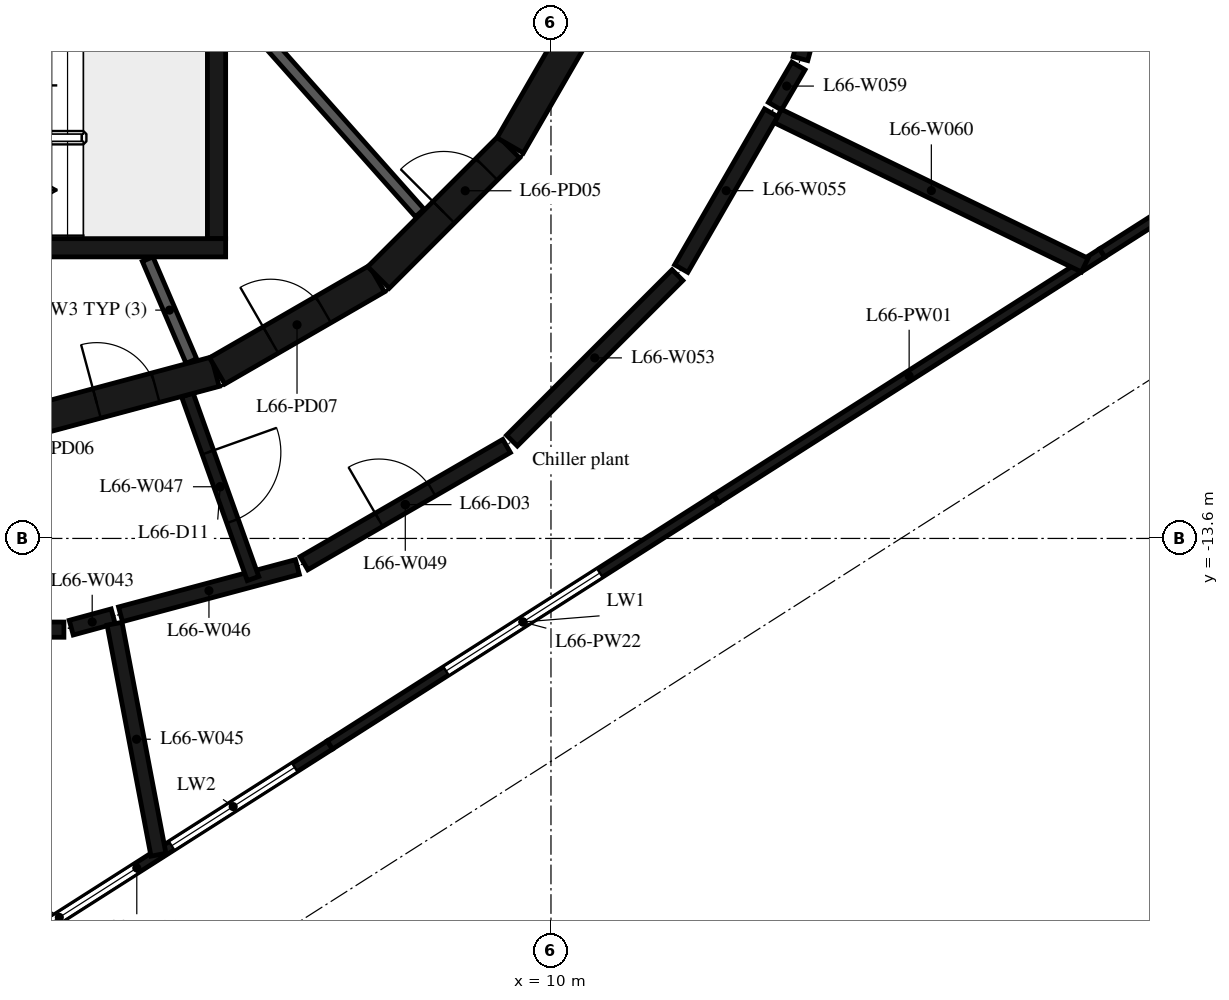
"""IFC4 building model, lengths in metres.
Left out: names, types, materials, properties, quantities, classifications, styles, units other than length and angle.
Written with IfcOpenShell. Run it as: python <this file> out.ifc"""

import sys

from ifc_helpers import new_model, si_unit, direction, frame, frame_2d, origin, place, context, subcontext, project, spatial, rectangle, extrude, element, fill, save


model = new_model("IFC4")
c1 = context("Model", 3, precision=1e-05, world=origin(), true_north=direction((0.0, 1.0)))
c2 = subcontext(c1, "Body", "Model", "MODEL_VIEW")
j1 = project(units=[si_unit("LENGTHUNIT", "METRE"), si_unit("PLANEANGLEUNIT", "RADIAN")], contexts=[c1])
p1 = place(None, origin())
s1 = spatial("IfcSite", under=j1, at=p1, CompositionType="ELEMENT")
p2 = place(p1, origin())
s2 = spatial("IfcBuilding", under=s1, at=p2, CompositionType="ELEMENT")
p3 = place(p2, frame((0.0, 0.0, 258.2)))
s3 = spatial("IfcBuildingStorey", under=s2, at=p3, CompositionType="ELEMENT", Elevation=258.2)
p4 = place(p3, frame((12.715, -12.951, 0.0), z_axis=(0.0, 0.0, 1.0), x_axis=(0.843393042763, 0.537297101629, 0.0)))
e1 = element("IfcWall", 1, at=p4, inside=s3, PredefinedType="STANDARD", context=c2, shape_type="SweptSolid", body=[
    extrude(rectangle(XDim=7.53, YDim=0.16, at=frame_2d((3.765, 0.0))), origin(), (0.0, 0.0, 1.0), 4.75),
])
p5 = place(p3, frame((19.066, -8.905, 0.0), z_axis=(0.0, 0.0, 1.0), x_axis=(0.843393436183, 0.537296484079, 0.0)))
e2 = element("IfcWall", 2, at=p5, inside=s3, PredefinedType="STANDARD", context=c2, shape_type="SweptSolid", body=[
    extrude(rectangle(XDim=5.74, YDim=0.16, at=frame_2d((2.87, 0.0))), origin(), (0.0, 0.0, 1.0), 4.75),
])
p6 = place(p3, frame((0.013, -21.043, 0.0), z_axis=(0.0, 0.0, 1.0), x_axis=(0.843393042763, 0.537297101629, 0.0)))
e3 = element("IfcWall", 3, at=p6, inside=s3, PredefinedType="STANDARD", context=c2, shape_type="SweptSolid", body=[
    extrude(rectangle(XDim=7.53, YDim=0.16, at=frame_2d((3.765, 0.0))), origin(), (0.0, 0.0, 1.0), 4.75),
])
p7 = place(p6, frame((0.755, 0.0, 1.0)))
e4 = element("IfcOpeningElement", 4, at=p7, cuts=e3, PredefinedType="OPENING", context=c2, shape_type="SweptSolid", body=[
    extrude(rectangle(XDim=3.0, YDim=2.2, at=frame_2d((1.5, 1.1))), frame((0.0, 0.09, 0.0), z_axis=(0.0, -1.0, 0.0), x_axis=(1.0, 0.0, 0.0)), (0.0, 0.0, 1.0), 0.18),
])
p8 = place(p6, frame((4.445, 0.0, 1.0)))
e5 = element("IfcOpeningElement", 5, at=p8, cuts=e3, PredefinedType="OPENING", context=c2, shape_type="SweptSolid", body=[
    extrude(rectangle(XDim=2.4, YDim=2.2, at=frame_2d((1.2, 1.1))), frame((0.0, 0.09, 0.0), z_axis=(0.0, -1.0, 0.0), x_axis=(1.0, 0.0, 0.0)), (0.0, 0.0, 1.0), 0.18),
])
p9 = place(p3, frame((6.364, -16.997, 0.0), z_axis=(0.0, 0.0, 1.0), x_axis=(0.843393042763, 0.537297101629, 0.0)))
e6 = element("IfcWall", 6, at=p9, inside=s3, PredefinedType="STANDARD", context=c2, shape_type="SweptSolid", body=[
    extrude(rectangle(XDim=7.53, YDim=0.16, at=frame_2d((3.765, 0.0))), origin(), (0.0, 0.0, 1.0), 4.75),
])
p10 = place(p9, frame((2.265, 0.0, 1.0)))
e7 = element("IfcOpeningElement", 7, at=p10, cuts=e6, PredefinedType="OPENING", context=c2, shape_type="SweptSolid", body=[
    extrude(rectangle(XDim=3.0, YDim=2.2, at=frame_2d((1.5, 1.1))), frame((0.0, 0.09, 0.0), z_axis=(0.0, -1.0, 0.0), x_axis=(1.0, 0.0, 0.0)), (0.0, 0.0, 1.0), 0.18),
])
p11 = place(p3, frame((1.55, -11.643, 0.0), z_axis=(0.0, 0.0, 1.0), x_axis=(0.965948410781, 0.258734743916, 0.0)))
e8 = element("IfcWall", 8, at=p11, inside=s3, PredefinedType="SHEAR", context=c2, shape_type="SweptSolid", body=[
    extrude(rectangle(XDim=3.033, YDim=0.5, at=frame_2d((1.516, 0.0))), origin(), (0.0, 0.0, 1.0), 4.75),
])
p12 = place(p11, frame((1.016, 0.0, 0.0)))
e9 = element("IfcOpeningElement", 9, at=p12, cuts=e8, PredefinedType="OPENING", context=c2, shape_type="SweptSolid", body=[
    extrude(rectangle(XDim=1.0, YDim=2.4, at=frame_2d((0.5, 1.2))), frame((0.0, 0.26, 0.0), z_axis=(0.0, -1.0, 0.0), x_axis=(1.0, 0.0, 0.0)), (0.0, 0.0, 1.0), 0.52),
])
p13 = place(p3, frame((4.51, -10.845, 0.0), z_axis=(0.0, 0.0, 1.0), x_axis=(0.865975092491, 0.500087131594, 0.0)))
e10 = element("IfcWall", 10, at=p13, inside=s3, PredefinedType="SHEAR", context=c2, shape_type="SweptSolid", body=[
    extrude(rectangle(XDim=3.033, YDim=0.5, at=frame_2d((1.516, 0.0))), origin(), (0.0, 0.0, 1.0), 4.75),
])
p14 = place(p13, frame((1.016, 0.0, 0.0)))
e11 = element("IfcOpeningElement", 11, at=p14, cuts=e10, PredefinedType="OPENING", context=c2, shape_type="SweptSolid", body=[
    extrude(rectangle(XDim=1.0, YDim=2.4, at=frame_2d((0.5, 1.2))), frame((0.0, 0.26, 0.0), z_axis=(0.0, -1.0, 0.0), x_axis=(1.0, 0.0, 0.0)), (0.0, 0.0, 1.0), 0.52),
])
p15 = place(p3, frame((7.164, -9.308, 0.0), z_axis=(0.0, 0.0, 1.0), x_axis=(0.707106781187, 0.707106781187, 0.0)))
e12 = element("IfcWall", 12, at=p15, inside=s3, PredefinedType="SHEAR", context=c2, shape_type="SweptSolid", body=[
    extrude(rectangle(XDim=3.032, YDim=0.5, at=frame_2d((1.516, 0.0))), origin(), (0.0, 0.0, 1.0), 4.75),
])
p16 = place(p15, frame((1.516, 0.0, 0.0)))
e13 = element("IfcOpeningElement", 13, at=p16, cuts=e12, PredefinedType="OPENING", context=c2, shape_type="SweptSolid", body=[
    extrude(rectangle(XDim=1.0, YDim=2.4, at=frame_2d((0.5, 1.2))), frame((0.0, 0.26, 0.0), z_axis=(0.0, -1.0, 0.0), x_axis=(1.0, 0.0, 0.0)), (0.0, 0.0, 1.0), 0.52),
])
p17 = place(p3, frame((9.329, -7.137, 0.0), z_axis=(0.0, 0.0, 1.0), x_axis=(0.500087131594, 0.865975092491, 0.0)))
e14 = element("IfcWall", 14, at=p17, inside=s3, PredefinedType="SHEAR", context=c2, shape_type="SweptSolid", body=[
    extrude(rectangle(XDim=3.033, YDim=0.5, at=frame_2d((1.516, 0.0))), origin(), (0.0, 0.0, 1.0), 4.75),
])
p18 = place(p3, frame((4.5, -8.67, 0.0), z_axis=(0.0, 0.0, 1.0), x_axis=(0.0, 1.0, 0.0)))
e15 = element("IfcWall", 15, at=p18, inside=s3, PredefinedType="SHEAR", context=c2, shape_type="SweptSolid", body=[
    extrude(rectangle(XDim=3.32, YDim=0.3, at=frame_2d((1.66, 0.0))), origin(), (0.0, 0.0, 1.0), 4.75),
])
p19 = place(p3, frame((0.1, -8.82, 0.0), z_axis=(0.0, 0.0, 1.0), x_axis=(1.0, 0.0, 0.0)))
e16 = element("IfcWall", 16, at=p19, inside=s3, PredefinedType="SHEAR", context=c2, shape_type="SweptSolid", body=[
    extrude(rectangle(XDim=4.55, YDim=0.3, at=frame_2d((2.275, 0.0))), origin(), (0.0, 0.0, 1.0), 4.75),
])
p20 = place(p3, frame((7.842, -8.248, 0.0), z_axis=(0.0, 0.0, 1.0), x_axis=(-0.66446128181, 0.747322691329, 0.0)))
e17 = element("IfcWall", 17, at=p20, inside=s3, PredefinedType="PARTITIONING", context=c2, shape_type="SweptSolid", body=[
    extrude(rectangle(XDim=4.198, YDim=0.19, at=frame_2d((2.099, 0.0))), origin(), (0.0, 0.0, 1.0), 4.75),
])
p21 = place(p3, frame((3.367, -9.007, 0.0), z_axis=(0.0, 0.0, 1.0), x_axis=(0.394387482265, -0.918944238696, 0.0)))
e18 = element("IfcWall", 18, at=p21, inside=s3, PredefinedType="PARTITIONING", context=c2, shape_type="SweptSolid", body=[
    extrude(rectangle(XDim=1.825, YDim=0.19, at=frame_2d((0.913, 0.0))), origin(), (0.0, 0.0, 1.0), 4.75),
])
p22 = place(p3, frame((-1.865, -15.1, 0.0), z_axis=(0.0, 0.0, 1.0), x_axis=(1.0, 0.0, 0.0)))
e19 = element("IfcWall", 19, at=p22, inside=s3, PredefinedType="PARTITIONING", context=c2, shape_type="SweptSolid", body=[
    extrude(rectangle(XDim=3.855, YDim=0.25, at=frame_2d((1.927, 0.0))), origin(), (0.0, 0.0, 1.0), 4.75),
])
p23 = place(p22, frame((1.427, 0.0, 0.0)))
e20 = element("IfcOpeningElement", 20, at=p23, cuts=e19, PredefinedType="OPENING", context=c2, shape_type="SweptSolid", body=[
    extrude(rectangle(XDim=1.0, YDim=2.1, at=frame_2d((0.5, 1.05))), frame((0.0, 0.135, 0.0), z_axis=(0.0, -1.0, 0.0), x_axis=(1.0, 0.0, 0.0)), (0.0, 0.0, 1.0), 0.27),
])
p24 = place(p3, frame((2.111, -15.067, 0.0), z_axis=(0.0, 0.0, 1.0), x_axis=(0.965039301335, 0.262105221007, 0.0)))
e21 = element("IfcWall", 21, at=p24, inside=s3, PredefinedType="PARTITIONING", context=c2, shape_type="SweptSolid", body=[
    extrude(rectangle(XDim=0.714, YDim=0.25, at=frame_2d((0.357, 0.0))), origin(), (0.0, 0.0, 1.0), 4.75),
])
p25 = place(p3, frame((2.823, -15.003, 0.0), z_axis=(0.0, 0.0, 1.0), x_axis=(0.18669720821, -0.982417504143, 0.0)))
e22 = element("IfcWall", 22, at=p25, inside=s3, PredefinedType="PARTITIONING", context=c2, shape_type="SweptSolid", body=[
    extrude(rectangle(XDim=3.867, YDim=0.25, at=frame_2d((1.933, 0.0))), origin(), (0.0, 0.0, 1.0), 4.75),
])
p26 = place(p3, frame((2.921, -14.848, 0.0), z_axis=(0.0, 0.0, 1.0), x_axis=(0.966090816863, 0.258202504969, 0.0)))
e23 = element("IfcWall", 23, at=p26, inside=s3, PredefinedType="PARTITIONING", context=c2, shape_type="SweptSolid", body=[
    extrude(rectangle(XDim=3.011, YDim=0.25, at=frame_2d((1.506, 0.0))), origin(), (0.0, 0.0, 1.0), 4.75),
])
p27 = place(p3, frame((4.02, -11.24, 0.0), z_axis=(0.0, 0.0, 1.0), x_axis=(0.336751058688, -0.941593715183, 0.0)))
e24 = element("IfcWall", 24, at=p27, inside=s3, PredefinedType="PARTITIONING", context=c2, shape_type="SweptSolid", body=[
    extrude(rectangle(XDim=3.207, YDim=0.2, at=frame_2d((1.604, 0.0))), origin(), (0.0, 0.0, 1.0), 4.75),
])
p28 = place(p27, frame((1.004, 0.0, 0.0)))
e25 = element("IfcOpeningElement", 25, at=p28, cuts=e24, PredefinedType="OPENING", context=c2, shape_type="SweptSolid", body=[
    extrude(rectangle(XDim=1.2, YDim=2.1, at=frame_2d((0.6, 1.05))), frame((0.0, 0.11, 0.0), z_axis=(0.0, -1.0, 0.0), x_axis=(1.0, 0.0, 0.0)), (0.0, 0.0, 1.0), 0.22),
])
p29 = place(p3, frame((5.938, -14.007, 0.0), z_axis=(0.0, 0.0, 1.0), x_axis=(0.865615852585, 0.500708693508, 0.0)))
e26 = element("IfcWall", 26, at=p29, inside=s3, PredefinedType="PARTITIONING", context=c2, shape_type="SweptSolid", body=[
    extrude(rectangle(XDim=3.849, YDim=0.25, at=frame_2d((1.925, 0.0))), origin(), (0.0, 0.0, 1.0), 4.75),
])
p30 = place(p29, frame((1.425, 0.0, 0.0)))
e27 = element("IfcOpeningElement", 27, at=p30, cuts=e26, PredefinedType="OPENING", context=c2, shape_type="SweptSolid", body=[
    extrude(rectangle(XDim=1.0, YDim=2.1, at=frame_2d((0.5, 1.05))), frame((0.0, 0.135, 0.0), z_axis=(0.0, -1.0, 0.0), x_axis=(1.0, 0.0, 0.0)), (0.0, 0.0, 1.0), 0.27),
])
p31 = place(p3, frame((9.358, -11.992, 0.0), z_axis=(0.0, 0.0, 1.0), x_axis=(0.707106781187, 0.707106781187, 0.0)))
e28 = element("IfcWall", 28, at=p31, inside=s3, PredefinedType="PARTITIONING", context=c2, shape_type="SweptSolid", body=[
    extrude(rectangle(XDim=3.849, YDim=0.25, at=frame_2d((1.925, 0.0))), origin(), (0.0, 0.0, 1.0), 4.75),
])
p32 = place(p3, frame((12.142, -9.162, 0.0), z_axis=(0.0, 0.0, 1.0), x_axis=(0.499717688814, 0.866188334882, 0.0)))
e29 = element("IfcWall", 29, at=p32, inside=s3, PredefinedType="PARTITIONING", context=c2, shape_type="SweptSolid", body=[
    extrude(rectangle(XDim=2.957, YDim=0.25, at=frame_2d((1.479, 0.0))), origin(), (0.0, 0.0, 1.0), 4.75),
])
p33 = place(p3, frame((13.683, -6.492, 0.0), z_axis=(0.0, 0.0, 1.0), x_axis=(0.504583428371, 0.863362938638, 0.0)))
e30 = element("IfcWall", 30, at=p33, inside=s3, PredefinedType="PARTITIONING", context=c2, shape_type="SweptSolid", body=[
    extrude(rectangle(XDim=0.767, YDim=0.25, at=frame_2d((0.383, 0.0))), origin(), (0.0, 0.0, 1.0), 4.75),
])
p34 = place(p3, frame((13.732, -6.655, 0.0), z_axis=(0.0, 0.0, 1.0), x_axis=(0.899529661215, -0.436859689825, 0.0)))
e31 = element("IfcWall", 31, at=p34, inside=s3, PredefinedType="PARTITIONING", context=c2, shape_type="SweptSolid", body=[
    extrude(rectangle(XDim=5.609, YDim=0.25, at=frame_2d((2.805, 0.0))), origin(), (0.0, 0.0, 1.0), 4.75),
])
p35 = place(p3, frame((14.102, -5.709, 0.0), z_axis=(0.0, 0.0, 1.0), x_axis=(0.259118468411, 0.965845546311, 0.0)))
e32 = element("IfcWall", 32, at=p35, inside=s3, PredefinedType="PARTITIONING", context=c2, shape_type="SweptSolid", body=[
    extrude(rectangle(XDim=3.851, YDim=0.25, at=frame_2d((1.925, 0.0))), origin(), (0.0, 0.0, 1.0), 4.75),
])
p36 = place(p7, origin())
e33 = element("IfcWindow", 33, at=p36, inside=s3, PartitioningType="SINGLE_PANEL", PredefinedType="WINDOW", context=c2, shape_type="SweptSolid", body=[
    extrude(rectangle(XDim=3.0, YDim=2.2, at=frame_2d((1.5, 1.1))), frame((0.0, 0.03, 0.0), z_axis=(0.0, -1.0, 0.0), x_axis=(1.0, 0.0, 0.0)), (0.0, 0.0, 1.0), 0.06),
])
fill(e4, e33)
p37 = place(p8, origin())
e34 = element("IfcWindow", 34, at=p37, inside=s3, PartitioningType="SINGLE_PANEL", PredefinedType="WINDOW", context=c2, shape_type="SweptSolid", body=[
    extrude(rectangle(XDim=2.4, YDim=2.2, at=frame_2d((1.2, 1.1))), frame((0.0, 0.03, 0.0), z_axis=(0.0, -1.0, 0.0), x_axis=(1.0, 0.0, 0.0)), (0.0, 0.0, 1.0), 0.06),
])
fill(e5, e34)
p38 = place(p10, origin())
e35 = element("IfcWindow", 35, at=p38, inside=s3, PartitioningType="SINGLE_PANEL", PredefinedType="WINDOW", context=c2, shape_type="SweptSolid", body=[
    extrude(rectangle(XDim=3.0, YDim=2.2, at=frame_2d((1.5, 1.1))), frame((0.0, 0.03, 0.0), z_axis=(0.0, -1.0, 0.0), x_axis=(1.0, 0.0, 0.0)), (0.0, 0.0, 1.0), 0.06),
])
fill(e7, e35)
p39 = place(p16, origin())
e36 = element("IfcDoor", 36, at=p39, inside=s3, OperationType="SINGLE_SWING_LEFT", PredefinedType="DOOR", context=c2, shape_type="SweptSolid", body=[
    extrude(rectangle(XDim=1.0, YDim=2.4, at=frame_2d((0.5, 1.2))), frame((0.0, 0.025, 0.0), z_axis=(0.0, -1.0, 0.0), x_axis=(1.0, 0.0, 0.0)), (0.0, 0.0, 1.0), 0.05),
])
fill(e13, e36)
p40 = place(p12, origin())
e37 = element("IfcDoor", 37, at=p40, inside=s3, OperationType="SINGLE_SWING_RIGHT", PredefinedType="DOOR", context=c2, shape_type="SweptSolid", body=[
    extrude(rectangle(XDim=1.0, YDim=2.4, at=frame_2d((0.5, 1.2))), frame((0.0, 0.025, 0.0), z_axis=(0.0, -1.0, 0.0), x_axis=(1.0, 0.0, 0.0)), (0.0, 0.0, 1.0), 0.05),
])
fill(e9, e37)
p41 = place(p14, origin())
e38 = element("IfcDoor", 38, at=p41, inside=s3, OperationType="SINGLE_SWING_LEFT", PredefinedType="DOOR", context=c2, shape_type="SweptSolid", body=[
    extrude(rectangle(XDim=1.0, YDim=2.4, at=frame_2d((0.5, 1.2))), frame((0.0, 0.025, 0.0), z_axis=(0.0, -1.0, 0.0), x_axis=(1.0, 0.0, 0.0)), (0.0, 0.0, 1.0), 0.05),
])
fill(e11, e38)
p42 = place(p30, origin())
e39 = element("IfcDoor", 39, at=p42, inside=s3, OperationType="SINGLE_SWING_LEFT", PredefinedType="DOOR", context=c2, shape_type="SweptSolid", body=[
    extrude(rectangle(XDim=1.0, YDim=2.1, at=frame_2d((0.5, 1.05))), frame((0.0, 0.025, 0.0), z_axis=(0.0, -1.0, 0.0), x_axis=(1.0, 0.0, 0.0)), (0.0, 0.0, 1.0), 0.05),
])
fill(e27, e39)
p43 = place(p28, origin())
e40 = element("IfcDoor", 40, at=p43, inside=s3, OperationType="SINGLE_SWING_LEFT", PredefinedType="DOOR", context=c2, shape_type="SweptSolid", body=[
    extrude(rectangle(XDim=1.2, YDim=2.1, at=frame_2d((0.6, 1.05))), frame((0.0, 0.025, 0.0), z_axis=(0.0, -1.0, 0.0), x_axis=(1.0, 0.0, 0.0)), (0.0, 0.0, 1.0), 0.05),
])
fill(e25, e40)
save(model, sys.argv[1])
